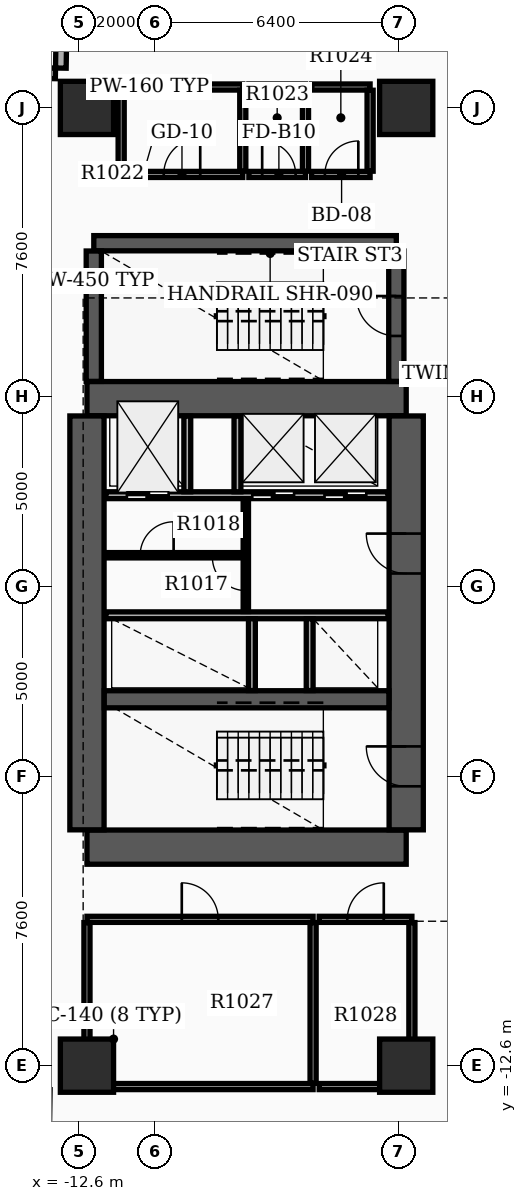
"""IFC4 building model, lengths in metres.
Left out: names, types, materials, properties, quantities, classifications, styles, units other than length and angle.
Written with IfcOpenShell. Run it as: python <this file> out.ifc"""

import sys

from ifc_helpers import new_model, si_unit, direction, frame, frame_2d, origin, origin_2d, place, context, subcontext, project, spatial, rectangle, extrude, element, fill, save


model = new_model("IFC4")
c1 = context("Model", 3, precision=1e-05, world=origin(), true_north=direction((0.0, 1.0)))
c2 = subcontext(c1, "Body", "Model", "MODEL_VIEW")
j1 = project(units=[si_unit("LENGTHUNIT", "METRE"), si_unit("PLANEANGLEUNIT", "RADIAN")], contexts=[c1])
p1 = place(None, origin())
s1 = spatial("IfcSite", under=j1, at=p1, CompositionType="ELEMENT")
p2 = place(p1, origin())
s2 = spatial("IfcBuilding", under=s1, at=p2, CompositionType="ELEMENT")
p3 = place(p2, frame((0.0, 0.0, 67.8)))
s3 = spatial("IfcBuildingStorey", under=s2, at=p3, CompositionType="ELEMENT", Elevation=67.8)
for number, where, z_axis, x_axis in (
    (1, (-12.4, -6.85, 0.0), (0.0, 0.0, 1.0), (1.0, 0.0, 0.0)),
    (2, (-12.4, 4.95, 0.0), (0.0, 0.0, 1.0), (1.0, 0.0, 0.0)),
):
    element("IfcWall", number, at=place(p3, frame(where, z_axis=z_axis, x_axis=x_axis)), inside=s3, PredefinedType="SHEAR", context=c2, shape_type="SweptSolid", body=[
        extrude(rectangle(XDim=8.4, YDim=0.9, at=frame_2d((4.2, 0.0))), origin(), (0.0, 0.0, 1.0), 3.7),
    ])
p4 = place(p3, frame((-12.4, -6.395, 0.0), z_axis=(0.0, 0.0, 1.0), x_axis=(0.0, 1.0, 0.0)))
e3 = element("IfcWall", 3, at=p4, inside=s3, PredefinedType="SHEAR", context=c2, shape_type="SweptSolid", body=[
    extrude(rectangle(XDim=10.89, YDim=0.9, at=frame_2d((5.445, 0.0))), origin(), (0.0, 0.0, 1.0), 3.7),
])
p5 = place(p3, frame((-4.0, -6.395, 0.0), z_axis=(0.0, 0.0, 1.0), x_axis=(0.0, 1.0, 0.0)))
e4 = element("IfcWall", 4, at=p5, inside=s3, PredefinedType="SHEAR", context=c2, shape_type="SweptSolid", body=[
    extrude(rectangle(XDim=10.89, YDim=0.9, at=frame_2d((5.445, 0.0))), origin(), (0.0, 0.0, 1.0), 3.7),
])
p6 = place(p5, frame((1.145, 0.0, 0.0)))
e5 = element("IfcOpeningElement", 5, at=p6, cuts=e4, PredefinedType="OPENING", context=c2, shape_type="SweptSolid", body=[
    extrude(rectangle(XDim=1.05, YDim=2.15, at=frame_2d((0.525, 1.075))), frame((0.0, 0.46, 0.0), z_axis=(0.0, -1.0, 0.0), x_axis=(1.0, 0.0, 0.0)), (0.0, 0.0, 1.0), 0.92),
])
p7 = place(p5, frame((6.745, 0.0, 0.0)))
e6 = element("IfcOpeningElement", 6, at=p7, cuts=e4, PredefinedType="OPENING", context=c2, shape_type="SweptSolid", body=[
    extrude(rectangle(XDim=1.05, YDim=2.15, at=frame_2d((0.525, 1.075))), frame((0.0, 0.46, 0.0), z_axis=(0.0, -1.0, 0.0), x_axis=(1.0, 0.0, 0.0)), (0.0, 0.0, 1.0), 0.92),
])
p8 = place(p3, frame((-11.945, -2.96, 0.0), z_axis=(0.0, 0.0, 1.0), x_axis=(1.0, 0.0, 0.0)))
e7 = element("IfcWall", 7, at=p8, inside=s3, PredefinedType="SHEAR", context=c2, shape_type="SweptSolid", body=[
    extrude(rectangle(XDim=7.49, YDim=0.45, at=frame_2d((3.745, 0.0))), origin(), (0.0, 0.0, 1.0), 3.7),
])
p9 = place(p3, frame((-12.22, 9.04, 0.0), z_axis=(0.0, 0.0, 1.0), x_axis=(1.0, 0.0, 0.0)))
e8 = element("IfcWall", 8, at=p9, inside=s3, PredefinedType="SHEAR", context=c2, shape_type="SweptSolid", body=[
    extrude(rectangle(XDim=7.96, YDim=0.4, at=frame_2d((3.98, 0.0))), origin(), (0.0, 0.0, 1.0), 3.7),
])
p10 = place(p3, frame((-12.22, 5.405, 0.0), z_axis=(0.0, 0.0, 1.0), x_axis=(0.0, 1.0, 0.0)))
e9 = element("IfcWall", 9, at=p10, inside=s3, PredefinedType="SHEAR", context=c2, shape_type="SweptSolid", body=[
    extrude(rectangle(XDim=3.43, YDim=0.4, at=frame_2d((1.715, 0.0))), origin(), (0.0, 0.0, 1.0), 3.7),
])
p11 = place(p3, frame((-4.26, 5.405, 0.0), z_axis=(0.0, 0.0, 1.0), x_axis=(0.0, 1.0, 0.0)))
e10 = element("IfcWall", 10, at=p11, inside=s3, PredefinedType="SHEAR", context=c2, shape_type="SweptSolid", body=[
    extrude(rectangle(XDim=3.43, YDim=0.4, at=frame_2d((1.715, 0.0))), origin(), (0.0, 0.0, 1.0), 3.7),
])
p12 = place(p11, frame((1.195, 0.0, 0.0)))
e11 = element("IfcOpeningElement", 11, at=p12, cuts=e10, PredefinedType="OPENING", context=c2, shape_type="SweptSolid", body=[
    extrude(rectangle(XDim=1.05, YDim=2.15, at=frame_2d((0.525, 1.075))), frame((0.0, 0.21, 0.0), z_axis=(0.0, -1.0, 0.0), x_axis=(1.0, 0.0, 0.0)), (0.0, 0.0, 1.0), 0.42),
])
for number, where, z_axis, x_axis in (
    (12, (-12.4, -12.6, 0.0), (0.0, 0.0, 1.0), (1.0, 0.0, 0.0)),
    (13, (-12.4, 12.6, 0.0), (0.0, 0.0, 1.0), (1.0, 0.0, 0.0)),
    (14, (-4.0, -12.6, 0.0), (0.0, 0.0, 1.0), (1.0, 0.0, 0.0)),
    (15, (-4.0, 12.6, 0.0), (0.0, 0.0, 1.0), (1.0, 0.0, 0.0)),
):
    element("IfcColumn", number, at=place(p3, frame(where, z_axis=z_axis, x_axis=x_axis)), inside=s3, PredefinedType="COLUMN", context=c2, shape_type="SweptSolid", body=[
        extrude(rectangle(XDim=1.4, YDim=1.4, at=origin_2d()), origin(), (0.0, 0.0, 1.0), 3.9),
    ])
p13 = place(p3, frame((-14.449, 13.529, 0.0), z_axis=(0.0, 0.0, 1.0), x_axis=(0.999878147354, -0.015610587569, 0.0)))
e16 = element("IfcWall", 16, at=p13, inside=s3, PredefinedType="STANDARD", context=c2, shape_type="SweptSolid", body=[
    extrude(rectangle(XDim=1.22, YDim=0.28, at=frame_2d((0.61, 0.0))), origin(), (0.0, 0.0, 1.0), 2.91),
])
p14 = place(p3, frame((-13.087, 13.647, 0.0), z_axis=(0.0, 0.0, 1.0), x_axis=(0.015785793208, 0.999875396603, 0.0)))
e17 = element("IfcWall", 17, at=p14, inside=s3, PredefinedType="STANDARD", context=c2, shape_type="SweptSolid", body=[
    extrude(rectangle(XDim=1.5, YDim=0.28, at=frame_2d((0.75, 0.0))), origin(), (0.0, 0.0, 1.0), 2.91),
])
p15 = place(p3, frame((-11.9, 2.41, 0.0), z_axis=(0.0, 0.0, 1.0), x_axis=(1.0, 0.0, 0.0)))
e18 = element("IfcWall", 18, at=p15, inside=s3, PredefinedType="SOLIDWALL", context=c2, shape_type="SweptSolid", body=[
    extrude(rectangle(XDim=7.42, YDim=0.18, at=frame_2d((3.71, 0.0))), origin(), (0.0, 0.0, 1.0), 2.9),
])
p16 = place(p15, frame((0.55, 0.0, 0.0)))
e19 = element("IfcOpeningElement", 19, at=p16, cuts=e18, PredefinedType="OPENING", context=c2, shape_type="SweptSolid", body=[
    extrude(rectangle(XDim=1.1, YDim=2.15, at=frame_2d((0.55, 1.075))), frame((0.0, 0.1, 0.0), z_axis=(0.0, -1.0, 0.0), x_axis=(1.0, 0.0, 0.0)), (0.0, 0.0, 1.0), 0.2),
])
p17 = place(p15, frame((3.85, 0.0, 0.0)))
e20 = element("IfcOpeningElement", 20, at=p17, cuts=e18, PredefinedType="OPENING", context=c2, shape_type="SweptSolid", body=[
    extrude(rectangle(XDim=1.1, YDim=2.15, at=frame_2d((0.55, 1.075))), frame((0.0, 0.1, 0.0), z_axis=(0.0, -1.0, 0.0), x_axis=(1.0, 0.0, 0.0)), (0.0, 0.0, 1.0), 0.2),
])
p18 = place(p15, frame((5.75, 0.0, 0.0)))
e21 = element("IfcOpeningElement", 21, at=p18, cuts=e18, PredefinedType="OPENING", context=c2, shape_type="SweptSolid", body=[
    extrude(rectangle(XDim=1.1, YDim=2.15, at=frame_2d((0.55, 1.075))), frame((0.0, 0.1, 0.0), z_axis=(0.0, -1.0, 0.0), x_axis=(1.0, 0.0, 0.0)), (0.0, 0.0, 1.0), 0.2),
])
p19 = place(p3, frame((-11.9, -0.75, 0.0), z_axis=(0.0, 0.0, 1.0), x_axis=(1.0, 0.0, 0.0)))
e22 = element("IfcWall", 22, at=p19, inside=s3, PredefinedType="SOLIDWALL", context=c2, shape_type="SweptSolid", body=[
    extrude(rectangle(XDim=7.42, YDim=0.18, at=frame_2d((3.71, 0.0))), origin(), (0.0, 0.0, 1.0), 2.9),
])
for number, where, z_axis, x_axis in (
    (23, (-9.76, 2.5, 0.0), (0.0, 0.0, 1.0), (0.0, 1.0, 0.0)),
    (24, (-8.44, 2.5, 0.0), (0.0, 0.0, 1.0), (0.0, 1.0, 0.0)),
):
    element("IfcWall", number, at=place(p3, frame(where, z_axis=z_axis, x_axis=x_axis)), inside=s3, PredefinedType="SOLIDWALL", context=c2, shape_type="SweptSolid", body=[
        extrude(rectangle(XDim=1.99, YDim=0.18, at=frame_2d((0.995, 0.0))), origin(), (0.0, 0.0, 1.0), 2.9),
    ])
for number, where, z_axis, x_axis in (
    (25, (-8.06, -2.73, 0.0), (0.0, 0.0, 1.0), (0.0, 1.0, 0.0)),
    (26, (-6.54, -2.73, 0.0), (0.0, 0.0, 1.0), (0.0, 1.0, 0.0)),
):
    element("IfcWall", number, at=place(p3, frame(where, z_axis=z_axis, x_axis=x_axis)), inside=s3, PredefinedType="SOLIDWALL", context=c2, shape_type="SweptSolid", body=[
        extrude(rectangle(XDim=1.89, YDim=0.18, at=frame_2d((0.945, 0.0))), origin(), (0.0, 0.0, 1.0), 2.9),
    ])
p20 = place(p3, frame((-8.22, -0.65, 0.0), z_axis=(0.0, 0.0, 1.0), x_axis=(0.0, 1.0, 0.0)))
e27 = element("IfcWall", 27, at=p20, inside=s3, PredefinedType="SOLIDWALL", context=c2, shape_type="SweptSolid", body=[
    extrude(rectangle(XDim=2.96, YDim=0.14, at=frame_2d((1.48, 0.0))), origin(), (0.0, 0.0, 1.0), 2.9),
])
p21 = place(p20, frame((0.55, 0.0, 0.0)))
e28 = element("IfcOpeningElement", 28, at=p21, cuts=e27, PredefinedType="OPENING", context=c2, shape_type="SweptSolid", body=[
    extrude(rectangle(XDim=0.88, YDim=2.1, at=frame_2d((0.44, 1.05))), frame((0.0, 0.08, 0.0), z_axis=(0.0, -1.0, 0.0), x_axis=(1.0, 0.0, 0.0)), (0.0, 0.0, 1.0), 0.16),
])
p22 = place(p3, frame((-11.85, 0.83, 0.0), z_axis=(0.0, 0.0, 1.0), x_axis=(1.0, 0.0, 0.0)))
e29 = element("IfcWall", 29, at=p22, inside=s3, PredefinedType="PARTITIONING", context=c2, shape_type="SweptSolid", body=[
    extrude(rectangle(XDim=3.552, YDim=0.14, at=frame_2d((1.776, 0.0))), origin(), (0.0, 0.0, 1.0), 2.9),
])
p23 = place(p22, frame((0.85, 0.0, 0.0)))
e30 = element("IfcOpeningElement", 30, at=p23, cuts=e29, PredefinedType="OPENING", context=c2, shape_type="SweptSolid", body=[
    extrude(rectangle(XDim=0.88, YDim=2.1, at=frame_2d((0.44, 1.05))), frame((0.0, 0.08, 0.0), z_axis=(0.0, -1.0, 0.0), x_axis=(1.0, 0.0, 0.0)), (0.0, 0.0, 1.0), 0.16),
])
p24 = place(p3, frame((-11.5, 10.85, 0.0), z_axis=(0.0, 0.0, 1.0), x_axis=(1.0, 0.0, 0.0)))
e31 = element("IfcWall", 31, at=p24, inside=s3, PredefinedType="PARTITIONING", context=c2, shape_type="SweptSolid", body=[
    extrude(rectangle(XDim=3.2, YDim=0.16, at=frame_2d((1.6, 0.0))), origin(), (0.0, 0.0, 1.0), 2.9),
])
p25 = place(p24, frame((1.12, 0.0, 0.0)))
e32 = element("IfcOpeningElement", 32, at=p25, cuts=e31, PredefinedType="OPENING", context=c2, shape_type="SweptSolid", body=[
    extrude(rectangle(XDim=0.96, YDim=2.15, at=frame_2d((0.48, 1.075))), frame((0.0, 0.09, 0.0), z_axis=(0.0, -1.0, 0.0), x_axis=(1.0, 0.0, 0.0)), (0.0, 0.0, 1.0), 0.18),
])
p26 = place(p3, frame((-11.5, 13.15, 0.0), z_axis=(0.0, 0.0, 1.0), x_axis=(1.0, 0.0, 0.0)))
e33 = element("IfcWall", 33, at=p26, inside=s3, PredefinedType="PARTITIONING", context=c2, shape_type="SweptSolid", body=[
    extrude(rectangle(XDim=3.2, YDim=0.16, at=frame_2d((1.6, 0.0))), origin(), (0.0, 0.0, 1.0), 2.9),
])
for number, where, z_axis, x_axis in (
    (34, (-11.5, 10.935, 0.0), (0.0, 0.0, 1.0), (0.0, 1.0, 0.0)),
    (35, (-8.3, 10.935, 0.0), (0.0, 0.0, 1.0), (0.0, 1.0, 0.0)),
):
    element("IfcWall", number, at=place(p3, frame(where, z_axis=z_axis, x_axis=x_axis)), inside=s3, PredefinedType="PARTITIONING", context=c2, shape_type="SweptSolid", body=[
        extrude(rectangle(XDim=2.13, YDim=0.16, at=frame_2d((1.065, 0.0))), origin(), (0.0, 0.0, 1.0), 2.9),
    ])
p27 = place(p3, frame((-8.14, 10.85, 0.0), z_axis=(0.0, 0.0, 1.0), x_axis=(1.0, 0.0, 0.0)))
e36 = element("IfcWall", 36, at=p27, inside=s3, PredefinedType="PARTITIONING", context=c2, shape_type="SweptSolid", body=[
    extrude(rectangle(XDim=1.49, YDim=0.16, at=frame_2d((0.745, 0.0))), origin(), (0.0, 0.0, 1.0), 2.9),
])
p28 = place(p27, frame((0.35, 0.0, 0.0)))
e37 = element("IfcOpeningElement", 37, at=p28, cuts=e36, PredefinedType="OPENING", context=c2, shape_type="SweptSolid", body=[
    extrude(rectangle(XDim=0.88, YDim=2.1, at=frame_2d((0.44, 1.05))), frame((0.0, 0.09, 0.0), z_axis=(0.0, -1.0, 0.0), x_axis=(1.0, 0.0, 0.0)), (0.0, 0.0, 1.0), 0.18),
])
p29 = place(p3, frame((-8.14, 13.15, 0.0), z_axis=(0.0, 0.0, 1.0), x_axis=(1.0, 0.0, 0.0)))
e38 = element("IfcWall", 38, at=p29, inside=s3, PredefinedType="PARTITIONING", context=c2, shape_type="SweptSolid", body=[
    extrude(rectangle(XDim=1.49, YDim=0.16, at=frame_2d((0.745, 0.0))), origin(), (0.0, 0.0, 1.0), 2.9),
])
p30 = place(p3, frame((-6.65, 10.935, 0.0), z_axis=(0.0, 0.0, 1.0), x_axis=(0.0, 1.0, 0.0)))
e39 = element("IfcWall", 39, at=p30, inside=s3, PredefinedType="PARTITIONING", context=c2, shape_type="SweptSolid", body=[
    extrude(rectangle(XDim=2.13, YDim=0.16, at=frame_2d((1.065, 0.0))), origin(), (0.0, 0.0, 1.0), 2.9),
])
p31 = place(p3, frame((-6.49, 10.85, 0.0), z_axis=(0.0, 0.0, 1.0), x_axis=(1.0, 0.0, 0.0)))
e40 = element("IfcWall", 40, at=p31, inside=s3, PredefinedType="PARTITIONING", context=c2, shape_type="SweptSolid", body=[
    extrude(rectangle(XDim=1.54, YDim=0.16, at=frame_2d((0.77, 0.0))), origin(), (0.0, 0.0, 1.0), 2.9),
])
p32 = place(p31, frame((0.35, 0.0, 0.0)))
e41 = element("IfcOpeningElement", 41, at=p32, cuts=e40, PredefinedType="OPENING", context=c2, shape_type="SweptSolid", body=[
    extrude(rectangle(XDim=0.88, YDim=2.15, at=frame_2d((0.44, 1.075))), frame((0.0, 0.09, 0.0), z_axis=(0.0, -1.0, 0.0), x_axis=(1.0, 0.0, 0.0)), (0.0, 0.0, 1.0), 0.18),
])
p33 = place(p3, frame((-6.49, 13.15, 0.0), z_axis=(0.0, 0.0, 1.0), x_axis=(1.0, 0.0, 0.0)))
e42 = element("IfcWall", 42, at=p33, inside=s3, PredefinedType="PARTITIONING", context=c2, shape_type="SweptSolid", body=[
    extrude(rectangle(XDim=1.54, YDim=0.16, at=frame_2d((0.77, 0.0))), origin(), (0.0, 0.0, 1.0), 2.9),
])
p34 = place(p3, frame((-4.95, 10.935, 0.0), z_axis=(0.0, 0.0, 1.0), x_axis=(0.0, 1.0, 0.0)))
e43 = element("IfcWall", 43, at=p34, inside=s3, PredefinedType="PARTITIONING", context=c2, shape_type="SweptSolid", body=[
    extrude(rectangle(XDim=2.13, YDim=0.16, at=frame_2d((1.065, 0.0))), origin(), (0.0, 0.0, 1.0), 2.9),
])
p35 = place(p3, frame((-12.4, -13.15, 0.0), z_axis=(0.0, 0.0, 1.0), x_axis=(1.0, 0.0, 0.0)))
e44 = element("IfcWall", 44, at=p35, inside=s3, PredefinedType="PARTITIONING", context=c2, shape_type="SweptSolid", body=[
    extrude(rectangle(XDim=5.95, YDim=0.16, at=frame_2d((2.975, 0.0))), origin(), (0.0, 0.0, 1.0), 2.9),
])
p36 = place(p3, frame((-12.4, -8.75, 0.0), z_axis=(0.0, 0.0, 1.0), x_axis=(1.0, 0.0, 0.0)))
e45 = element("IfcWall", 45, at=p36, inside=s3, PredefinedType="PARTITIONING", context=c2, shape_type="SweptSolid", body=[
    extrude(rectangle(XDim=5.95, YDim=0.16, at=frame_2d((2.975, 0.0))), origin(), (0.0, 0.0, 1.0), 2.9),
])
p37 = place(p36, frame((2.495, 0.0, 0.0)))
e46 = element("IfcOpeningElement", 46, at=p37, cuts=e45, PredefinedType="OPENING", context=c2, shape_type="SweptSolid", body=[
    extrude(rectangle(XDim=0.96, YDim=2.15, at=frame_2d((0.48, 1.075))), frame((0.0, 0.09, 0.0), z_axis=(0.0, -1.0, 0.0), x_axis=(1.0, 0.0, 0.0)), (0.0, 0.0, 1.0), 0.18),
])
for number, where, z_axis, x_axis in (
    (47, (-12.4, -13.065, 0.0), (0.0, 0.0, 1.0), (0.0, 1.0, 0.0)),
    (48, (-6.45, -13.065, 0.0), (0.0, 0.0, 1.0), (0.0, 1.0, 0.0)),
):
    element("IfcWall", number, at=place(p3, frame(where, z_axis=z_axis, x_axis=x_axis)), inside=s3, PredefinedType="PARTITIONING", context=c2, shape_type="SweptSolid", body=[
        extrude(rectangle(XDim=4.23, YDim=0.16, at=frame_2d((2.115, 0.0))), origin(), (0.0, 0.0, 1.0), 2.9),
    ])
p38 = place(p3, frame((-6.29, -13.15, 0.0), z_axis=(0.0, 0.0, 1.0), x_axis=(1.0, 0.0, 0.0)))
e49 = element("IfcWall", 49, at=p38, inside=s3, PredefinedType="PARTITIONING", context=c2, shape_type="SweptSolid", body=[
    extrude(rectangle(XDim=2.44, YDim=0.16, at=frame_2d((1.22, 0.0))), origin(), (0.0, 0.0, 1.0), 2.9),
])
p39 = place(p3, frame((-6.29, -8.75, 0.0), z_axis=(0.0, 0.0, 1.0), x_axis=(1.0, 0.0, 0.0)))
e50 = element("IfcWall", 50, at=p39, inside=s3, PredefinedType="PARTITIONING", context=c2, shape_type="SweptSolid", body=[
    extrude(rectangle(XDim=2.44, YDim=0.16, at=frame_2d((1.22, 0.0))), origin(), (0.0, 0.0, 1.0), 2.9),
])
p40 = place(p39, frame((0.74, 0.0, 0.0)))
e51 = element("IfcOpeningElement", 51, at=p40, cuts=e50, PredefinedType="OPENING", context=c2, shape_type="SweptSolid", body=[
    extrude(rectangle(XDim=0.96, YDim=2.15, at=frame_2d((0.48, 1.075))), frame((0.0, 0.09, 0.0), z_axis=(0.0, -1.0, 0.0), x_axis=(1.0, 0.0, 0.0)), (0.0, 0.0, 1.0), 0.18),
])
p41 = place(p3, frame((-3.85, -13.065, 0.0), z_axis=(0.0, 0.0, 1.0), x_axis=(0.0, 1.0, 0.0)))
e52 = element("IfcWall", 52, at=p41, inside=s3, PredefinedType="PARTITIONING", context=c2, shape_type="SweptSolid", body=[
    extrude(rectangle(XDim=4.23, YDim=0.16, at=frame_2d((2.115, 0.0))), origin(), (0.0, 0.0, 1.0), 2.9),
])
p42 = place(p6, origin())
e53 = element("IfcDoor", 53, at=p42, inside=s3, OperationType="SINGLE_SWING_RIGHT", PredefinedType="DOOR", context=c2, shape_type="SweptSolid", body=[
    extrude(rectangle(XDim=1.05, YDim=2.15, at=frame_2d((0.525, 1.075))), frame((0.0, 0.025, 0.0), z_axis=(0.0, -1.0, 0.0), x_axis=(1.0, 0.0, 0.0)), (0.0, 0.0, 1.0), 0.05),
])
fill(e5, e53)
p43 = place(p7, origin())
e54 = element("IfcDoor", 54, at=p43, inside=s3, OperationType="SINGLE_SWING_RIGHT", PredefinedType="DOOR", context=c2, shape_type="SweptSolid", body=[
    extrude(rectangle(XDim=1.05, YDim=2.15, at=frame_2d((0.525, 1.075))), frame((0.0, 0.025, 0.0), z_axis=(0.0, -1.0, 0.0), x_axis=(1.0, 0.0, 0.0)), (0.0, 0.0, 1.0), 0.05),
])
fill(e6, e54)
p44 = place(p12, origin())
e55 = element("IfcDoor", 55, at=p44, inside=s3, OperationType="SINGLE_SWING_RIGHT", PredefinedType="DOOR", context=c2, shape_type="SweptSolid", body=[
    extrude(rectangle(XDim=1.05, YDim=2.15, at=frame_2d((0.525, 1.075))), frame((0.0, 0.025, 0.0), z_axis=(0.0, -1.0, 0.0), x_axis=(1.0, 0.0, 0.0)), (0.0, 0.0, 1.0), 0.05),
])
fill(e11, e55)
p45 = place(p16, origin())
e56 = element("IfcDoor", 56, at=p45, inside=s3, OperationType="DOUBLE_DOOR_SLIDING", PredefinedType="DOOR", context=c2, shape_type="SweptSolid", body=[
    extrude(rectangle(XDim=1.1, YDim=2.15, at=frame_2d((0.55, 1.075))), frame((0.0, 0.025, 0.0), z_axis=(0.0, -1.0, 0.0), x_axis=(1.0, 0.0, 0.0)), (0.0, 0.0, 1.0), 0.05),
])
fill(e19, e56)
p46 = place(p17, origin())
e57 = element("IfcDoor", 57, at=p46, inside=s3, OperationType="DOUBLE_DOOR_SLIDING", PredefinedType="DOOR", context=c2, shape_type="SweptSolid", body=[
    extrude(rectangle(XDim=1.1, YDim=2.15, at=frame_2d((0.55, 1.075))), frame((0.0, 0.025, 0.0), z_axis=(0.0, -1.0, 0.0), x_axis=(1.0, 0.0, 0.0)), (0.0, 0.0, 1.0), 0.05),
])
fill(e20, e57)
p47 = place(p18, origin())
e58 = element("IfcDoor", 58, at=p47, inside=s3, OperationType="DOUBLE_DOOR_SLIDING", PredefinedType="DOOR", context=c2, shape_type="SweptSolid", body=[
    extrude(rectangle(XDim=1.1, YDim=2.15, at=frame_2d((0.55, 1.075))), frame((0.0, 0.025, 0.0), z_axis=(0.0, -1.0, 0.0), x_axis=(1.0, 0.0, 0.0)), (0.0, 0.0, 1.0), 0.05),
])
fill(e21, e58)
p48 = place(p21, origin())
e59 = element("IfcDoor", 59, at=p48, inside=s3, OperationType="SINGLE_SWING_RIGHT", PredefinedType="DOOR", context=c2, shape_type="SweptSolid", body=[
    extrude(rectangle(XDim=0.88, YDim=2.1, at=frame_2d((0.44, 1.05))), frame((0.0, 0.025, 0.0), z_axis=(0.0, -1.0, 0.0), x_axis=(1.0, 0.0, 0.0)), (0.0, 0.0, 1.0), 0.05),
])
fill(e28, e59)
p49 = place(p23, origin())
e60 = element("IfcDoor", 60, at=p49, inside=s3, OperationType="SINGLE_SWING_RIGHT", PredefinedType="DOOR", context=c2, shape_type="SweptSolid", body=[
    extrude(rectangle(XDim=0.88, YDim=2.1, at=frame_2d((0.44, 1.05))), frame((0.0, 0.025, 0.0), z_axis=(0.0, -1.0, 0.0), x_axis=(1.0, 0.0, 0.0)), (0.0, 0.0, 1.0), 0.05),
])
fill(e30, e60)
p50 = place(p25, origin())
e61 = element("IfcDoor", 61, at=p50, inside=s3, OperationType="SINGLE_SWING_RIGHT", PredefinedType="DOOR", context=c2, shape_type="SweptSolid", body=[
    extrude(rectangle(XDim=0.96, YDim=2.15, at=frame_2d((0.48, 1.075))), frame((0.0, 0.025, 0.0), z_axis=(0.0, -1.0, 0.0), x_axis=(1.0, 0.0, 0.0)), (0.0, 0.0, 1.0), 0.05),
])
fill(e32, e61)
p51 = place(p28, origin())
e62 = element("IfcDoor", 62, at=p51, inside=s3, OperationType="SINGLE_SWING_LEFT", PredefinedType="DOOR", context=c2, shape_type="SweptSolid", body=[
    extrude(rectangle(XDim=0.88, YDim=2.1, at=frame_2d((0.44, 1.05))), frame((0.0, 0.025, 0.0), z_axis=(0.0, -1.0, 0.0), x_axis=(1.0, 0.0, 0.0)), (0.0, 0.0, 1.0), 0.05),
])
fill(e37, e62)
p52 = place(p32, origin())
e63 = element("IfcDoor", 63, at=p52, inside=s3, OperationType="SINGLE_SWING_RIGHT", PredefinedType="DOOR", context=c2, shape_type="SweptSolid", body=[
    extrude(rectangle(XDim=0.88, YDim=2.15, at=frame_2d((0.44, 1.075))), frame((0.0, 0.025, 0.0), z_axis=(0.0, -1.0, 0.0), x_axis=(1.0, 0.0, 0.0)), (0.0, 0.0, 1.0), 0.05),
])
fill(e41, e63)
p53 = place(p37, origin())
e64 = element("IfcDoor", 64, at=p53, inside=s3, OperationType="SINGLE_SWING_LEFT", PredefinedType="DOOR", context=c2, shape_type="SweptSolid", body=[
    extrude(rectangle(XDim=0.96, YDim=2.15, at=frame_2d((0.48, 1.075))), frame((0.0, 0.025, 0.0), z_axis=(0.0, -1.0, 0.0), x_axis=(1.0, 0.0, 0.0)), (0.0, 0.0, 1.0), 0.05),
])
fill(e46, e64)
p54 = place(p40, origin())
e65 = element("IfcDoor", 65, at=p54, inside=s3, OperationType="SINGLE_SWING_RIGHT", PredefinedType="DOOR", context=c2, shape_type="SweptSolid", body=[
    extrude(rectangle(XDim=0.96, YDim=2.15, at=frame_2d((0.48, 1.075))), frame((0.0, 0.025, 0.0), z_axis=(0.0, -1.0, 0.0), x_axis=(1.0, 0.0, 0.0)), (0.0, 0.0, 1.0), 0.05),
])
fill(e51, e65)
save(model, sys.argv[1])
